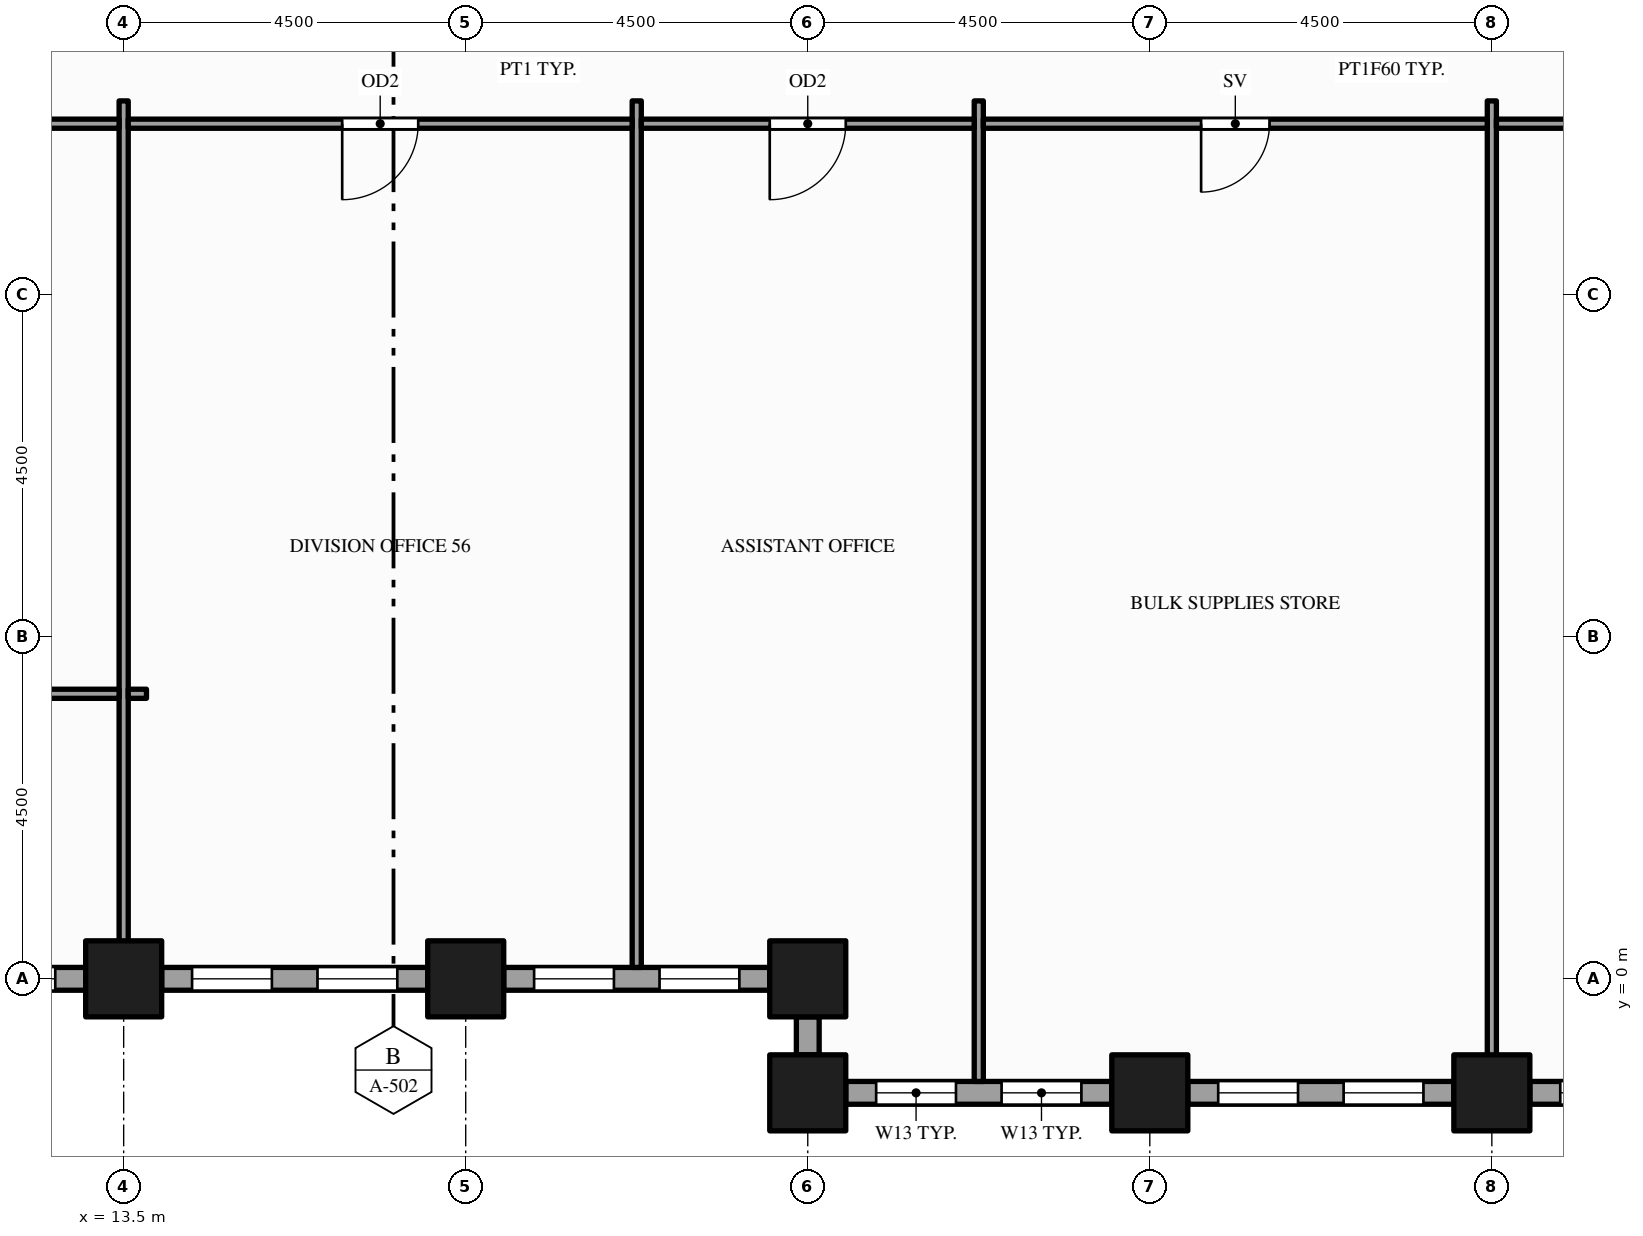
"""IFC4 building model, lengths in metres.
Left out: names, types, materials, properties, quantities, classifications, styles, units other than length and angle.
Written with IfcOpenShell. Run it as: python <this file> out.ifc"""

import sys

from ifc_helpers import new_model, si_unit, direction, frame, frame_2d, origin, origin_2d, place, context, subcontext, project, spatial, rectangle, hollow_rectangle, extrude, element, fill, save


model = new_model("IFC4")
c1 = context("Model", 3, precision=1e-05, world=origin(), true_north=direction((0.0, 1.0)))
c2 = subcontext(c1, "Body", "Model", "MODEL_VIEW")
j1 = project(units=[si_unit("LENGTHUNIT", "METRE"), si_unit("PLANEANGLEUNIT", "RADIAN")], contexts=[c1])
p1 = place(None, origin())
s1 = spatial("IfcSite", under=j1, at=p1, CompositionType="ELEMENT")
p2 = place(p1, origin())
s2 = spatial("IfcBuilding", under=s1, at=p2, CompositionType="ELEMENT")
p3 = place(p2, frame((0.0, 0.0, 127.0)))
s3 = spatial("IfcBuildingStorey", under=s2, at=p3, CompositionType="ELEMENT", Elevation=127.0)
for number, where, z_axis, x_axis in (
    (1, (13.5, 0.0, -0.15), (0.0, 0.0, 1.0), (1.0, 0.0, 0.0)),
    (2, (18.0, 0.0, -0.15), (0.0, 0.0, 1.0), (1.0, 0.0, 0.0)),
    (3, (22.5, -1.5, -0.15), (0.0, 0.0, 1.0), (1.0, 0.0, 0.0)),
    (4, (22.5, 0.0, -0.15), (0.0, 0.0, 1.0), (1.0, 0.0, 0.0)),
    (5, (27.0, -1.5, -0.15), (0.0, 0.0, 1.0), (1.0, 0.0, 0.0)),
    (6, (31.5, -1.5, -0.15), (0.0, 0.0, 1.0), (1.0, 0.0, 0.0)),
):
    element("IfcColumn", number, at=place(p3, frame(where, z_axis=z_axis, x_axis=x_axis)), inside=s3, PredefinedType="COLUMN", context=c2, shape_type="SweptSolid", body=[
        extrude(hollow_rectangle(XDim=1.0, YDim=1.0, WallThickness=0.05, at=origin_2d()), origin(), (0.0, 0.0, 1.0), 3.9),
    ])
p4 = place(p3, frame((23.0, -1.5, 0.0), z_axis=(0.0, 0.0, 1.0), x_axis=(1.0, 0.0, 0.0)))
e7 = element("IfcWall", 7, at=p4, inside=s3, PredefinedType="STANDARD", context=c2, shape_type="SweptSolid", body=[
    extrude(rectangle(XDim=3.5, YDim=0.3, at=frame_2d((1.75, 0.0))), origin(), (0.0, 0.0, 1.0), 3.054),
])
p5 = place(p4, frame((0.4, 0.0, 0.9)))
e8 = element("IfcOpeningElement", 8, at=p5, cuts=e7, PredefinedType="OPENING", context=c2, shape_type="SweptSolid", body=[
    extrude(rectangle(XDim=1.05, YDim=2.0, at=frame_2d((0.525, 1.0))), frame((0.0, 0.16, 0.0), z_axis=(0.0, -1.0, 0.0), x_axis=(1.0, 0.0, 0.0)), (0.0, 0.0, 1.0), 0.32),
])
p6 = place(p4, frame((2.05, 0.0, 0.9)))
e9 = element("IfcOpeningElement", 9, at=p6, cuts=e7, PredefinedType="OPENING", context=c2, shape_type="SweptSolid", body=[
    extrude(rectangle(XDim=1.05, YDim=2.0, at=frame_2d((0.525, 1.0))), frame((0.0, 0.16, 0.0), z_axis=(0.0, -1.0, 0.0), x_axis=(1.0, 0.0, 0.0)), (0.0, 0.0, 1.0), 0.32),
])
p7 = place(p3, frame((27.5, -1.5, 0.0), z_axis=(0.0, 0.0, 1.0), x_axis=(1.0, 0.0, 0.0)))
e10 = element("IfcWall", 10, at=p7, inside=s3, PredefinedType="STANDARD", context=c2, shape_type="SweptSolid", body=[
    extrude(rectangle(XDim=3.5, YDim=0.3, at=frame_2d((1.75, 0.0))), origin(), (0.0, 0.0, 1.0), 3.054),
])
p8 = place(p7, frame((0.4, 0.0, 0.9)))
e11 = element("IfcOpeningElement", 11, at=p8, cuts=e10, PredefinedType="OPENING", context=c2, shape_type="SweptSolid", body=[
    extrude(rectangle(XDim=1.05, YDim=2.0, at=frame_2d((0.525, 1.0))), frame((0.0, 0.16, 0.0), z_axis=(0.0, -1.0, 0.0), x_axis=(1.0, 0.0, 0.0)), (0.0, 0.0, 1.0), 0.32),
])
p9 = place(p7, frame((2.05, 0.0, 0.9)))
e12 = element("IfcOpeningElement", 12, at=p9, cuts=e10, PredefinedType="OPENING", context=c2, shape_type="SweptSolid", body=[
    extrude(rectangle(XDim=1.05, YDim=2.0, at=frame_2d((0.525, 1.0))), frame((0.0, 0.16, 0.0), z_axis=(0.0, -1.0, 0.0), x_axis=(1.0, 0.0, 0.0)), (0.0, 0.0, 1.0), 0.32),
])
p10 = place(p3, frame((32.0, -1.5, 0.0), z_axis=(0.0, 0.0, 1.0), x_axis=(1.0, 0.0, 0.0)))
e13 = element("IfcWall", 13, at=p10, inside=s3, PredefinedType="STANDARD", context=c2, shape_type="SweptSolid", body=[
    extrude(rectangle(XDim=3.5, YDim=0.3, at=frame_2d((1.75, 0.0))), origin(), (0.0, 0.0, 1.0), 3.054),
])
p11 = place(p10, frame((0.4, 0.0, 0.9)))
e14 = element("IfcOpeningElement", 14, at=p11, cuts=e13, PredefinedType="OPENING", context=c2, shape_type="SweptSolid", body=[
    extrude(rectangle(XDim=1.05, YDim=2.0, at=frame_2d((0.525, 1.0))), frame((0.0, 0.16, 0.0), z_axis=(0.0, -1.0, 0.0), x_axis=(1.0, 0.0, 0.0)), (0.0, 0.0, 1.0), 0.32),
])
p12 = place(p10, frame((2.05, 0.0, 0.9)))
e15 = element("IfcOpeningElement", 15, at=p12, cuts=e13, PredefinedType="OPENING", context=c2, shape_type="SweptSolid", body=[
    extrude(rectangle(XDim=1.05, YDim=2.0, at=frame_2d((0.525, 1.0))), frame((0.0, 0.16, 0.0), z_axis=(0.0, -1.0, 0.0), x_axis=(1.0, 0.0, 0.0)), (0.0, 0.0, 1.0), 0.32),
])
p13 = place(p3, frame((9.5, 0.0, 0.0), z_axis=(0.0, 0.0, 1.0), x_axis=(1.0, 0.0, 0.0)))
e16 = element("IfcWall", 16, at=p13, inside=s3, PredefinedType="STANDARD", context=c2, shape_type="SweptSolid", body=[
    extrude(rectangle(XDim=3.5, YDim=0.3, at=frame_2d((1.75, 0.0))), origin(), (0.0, 0.0, 1.0), 3.054),
])
p14 = place(p13, frame((0.4, 0.0, 0.9)))
e17 = element("IfcOpeningElement", 17, at=p14, cuts=e16, PredefinedType="OPENING", context=c2, shape_type="SweptSolid", body=[
    extrude(rectangle(XDim=1.05, YDim=2.0, at=frame_2d((0.525, 1.0))), frame((0.0, 0.16, 0.0), z_axis=(0.0, -1.0, 0.0), x_axis=(1.0, 0.0, 0.0)), (0.0, 0.0, 1.0), 0.32),
])
p15 = place(p13, frame((2.05, 0.0, 0.9)))
e18 = element("IfcOpeningElement", 18, at=p15, cuts=e16, PredefinedType="OPENING", context=c2, shape_type="SweptSolid", body=[
    extrude(rectangle(XDim=1.05, YDim=2.0, at=frame_2d((0.525, 1.0))), frame((0.0, 0.16, 0.0), z_axis=(0.0, -1.0, 0.0), x_axis=(1.0, 0.0, 0.0)), (0.0, 0.0, 1.0), 0.32),
])
p16 = place(p3, frame((14.0, 0.0, 0.0), z_axis=(0.0, 0.0, 1.0), x_axis=(1.0, 0.0, 0.0)))
e19 = element("IfcWall", 19, at=p16, inside=s3, PredefinedType="STANDARD", context=c2, shape_type="SweptSolid", body=[
    extrude(rectangle(XDim=3.5, YDim=0.3, at=frame_2d((1.75, 0.0))), origin(), (0.0, 0.0, 1.0), 3.054),
])
p17 = place(p16, frame((0.4, 0.0, 0.9)))
e20 = element("IfcOpeningElement", 20, at=p17, cuts=e19, PredefinedType="OPENING", context=c2, shape_type="SweptSolid", body=[
    extrude(rectangle(XDim=1.05, YDim=2.0, at=frame_2d((0.525, 1.0))), frame((0.0, 0.16, 0.0), z_axis=(0.0, -1.0, 0.0), x_axis=(1.0, 0.0, 0.0)), (0.0, 0.0, 1.0), 0.32),
])
p18 = place(p16, frame((2.05, 0.0, 0.9)))
e21 = element("IfcOpeningElement", 21, at=p18, cuts=e19, PredefinedType="OPENING", context=c2, shape_type="SweptSolid", body=[
    extrude(rectangle(XDim=1.05, YDim=2.0, at=frame_2d((0.525, 1.0))), frame((0.0, 0.16, 0.0), z_axis=(0.0, -1.0, 0.0), x_axis=(1.0, 0.0, 0.0)), (0.0, 0.0, 1.0), 0.32),
])
p19 = place(p3, frame((18.5, 0.0, 0.0), z_axis=(0.0, 0.0, 1.0), x_axis=(1.0, 0.0, 0.0)))
e22 = element("IfcWall", 22, at=p19, inside=s3, PredefinedType="STANDARD", context=c2, shape_type="SweptSolid", body=[
    extrude(rectangle(XDim=3.5, YDim=0.3, at=frame_2d((1.75, 0.0))), origin(), (0.0, 0.0, 1.0), 3.054),
])
p20 = place(p19, frame((0.4, 0.0, 0.9)))
e23 = element("IfcOpeningElement", 23, at=p20, cuts=e22, PredefinedType="OPENING", context=c2, shape_type="SweptSolid", body=[
    extrude(rectangle(XDim=1.05, YDim=2.0, at=frame_2d((0.525, 1.0))), frame((0.0, 0.16, 0.0), z_axis=(0.0, -1.0, 0.0), x_axis=(1.0, 0.0, 0.0)), (0.0, 0.0, 1.0), 0.32),
])
p21 = place(p19, frame((2.05, 0.0, 0.9)))
e24 = element("IfcOpeningElement", 24, at=p21, cuts=e22, PredefinedType="OPENING", context=c2, shape_type="SweptSolid", body=[
    extrude(rectangle(XDim=1.05, YDim=2.0, at=frame_2d((0.525, 1.0))), frame((0.0, 0.16, 0.0), z_axis=(0.0, -1.0, 0.0), x_axis=(1.0, 0.0, 0.0)), (0.0, 0.0, 1.0), 0.32),
])
p22 = place(p3, frame((22.5, -0.5, 0.0), z_axis=(0.0, 0.0, 1.0), x_axis=(0.0, -1.0, 0.0)))
e25 = element("IfcWall", 25, at=p22, inside=s3, PredefinedType="STANDARD", context=c2, shape_type="SweptSolid", body=[
    extrude(rectangle(XDim=0.5, YDim=0.3, at=frame_2d((0.25, 0.0))), origin(), (0.0, 0.0, 1.0), 3.054),
])
for number, where, z_axis, x_axis in (
    (26, (13.5, 0.15, 0.0), (0.0, 0.0, 1.0), (0.0, 1.0, 0.0)),
    (27, (20.25, 0.15, 0.0), (0.0, 0.0, 1.0), (0.0, 1.0, 0.0)),
):
    element("IfcWall", number, at=place(p3, frame(where, z_axis=z_axis, x_axis=x_axis)), inside=s3, PredefinedType="PARTITIONING", context=c2, shape_type="SweptSolid", body=[
        extrude(rectangle(XDim=11.4, YDim=0.12, at=frame_2d((5.7, 0.0))), origin(), (0.0, 0.0, 1.0), 2.838),
    ])
p23 = place(p3, frame((24.75, -1.35, 0.0), z_axis=(0.0, 0.0, 1.0), x_axis=(0.0, 1.0, 0.0)))
e28 = element("IfcWall", 28, at=p23, inside=s3, PredefinedType="PARTITIONING", context=c2, shape_type="SweptSolid", body=[
    extrude(rectangle(XDim=12.9, YDim=0.12, at=frame_2d((6.45, 0.0))), origin(), (0.0, 0.0, 1.0), 2.838),
])
p24 = place(p3, frame((31.5, -1.35, 0.0), z_axis=(0.0, 0.0, 1.0), x_axis=(0.0, 1.0, 0.0)))
e29 = element("IfcWall", 29, at=p24, inside=s3, PredefinedType="PARTITIONING", context=c2, shape_type="SweptSolid", body=[
    extrude(rectangle(XDim=12.9, YDim=0.12, at=frame_2d((6.45, 0.0))), origin(), (0.0, 0.0, 1.0), 2.35),
])
p25 = place(p3, frame((9.125, 3.75, 0.0), z_axis=(0.0, 0.0, 1.0), x_axis=(1.0, 0.0, 0.0)))
e30 = element("IfcWall", 30, at=p25, inside=s3, PredefinedType="PARTITIONING", context=c2, shape_type="SweptSolid", body=[
    extrude(rectangle(XDim=4.315, YDim=0.12, at=frame_2d((2.157, 0.0))), origin(), (0.0, 0.0, 1.0), 2.838),
])
p26 = place(p3, frame((13.56, 3.75, 0.0), z_axis=(0.0, 0.0, 1.0), x_axis=(1.0, 0.0, 0.0)))
e31 = element("IfcWall", 31, at=p26, inside=s3, PredefinedType="PARTITIONING", context=c2, shape_type="SweptSolid", body=[
    extrude(rectangle(XDim=0.24, YDim=0.12, at=frame_2d((0.12, 0.0))), origin(), (0.0, 0.0, 1.0), 2.838),
])
p27 = place(p3, frame((0.15, 11.25, 0.0), z_axis=(0.0, 0.0, 1.0), x_axis=(1.0, 0.0, 0.0)))
e32 = element("IfcWall", 32, at=p27, inside=s3, PredefinedType="PARTITIONING", context=c2, shape_type="SweptSolid", body=[
    extrude(rectangle(XDim=13.29, YDim=0.12, at=frame_2d((6.645, 0.0))), origin(), (0.0, 0.0, 1.0), 2.838),
])
p28 = place(p27, frame((6.055, 0.0, 0.0)))
e33 = element("IfcOpeningElement", 33, at=p28, cuts=e32, PredefinedType="OPENING", context=c2, shape_type="SweptSolid", body=[
    extrude(rectangle(XDim=1.2, YDim=2.1, at=frame_2d((0.6, 1.05))), frame((0.0, 0.07, 0.0), z_axis=(0.0, -1.0, 0.0), x_axis=(1.0, 0.0, 0.0)), (0.0, 0.0, 1.0), 0.14),
])
p29 = place(p3, frame((13.56, 11.25, 0.0), z_axis=(0.0, 0.0, 1.0), x_axis=(1.0, 0.0, 0.0)))
e34 = element("IfcWall", 34, at=p29, inside=s3, PredefinedType="PARTITIONING", context=c2, shape_type="SweptSolid", body=[
    extrude(rectangle(XDim=6.63, YDim=0.12, at=frame_2d((3.315, 0.0))), origin(), (0.0, 0.0, 1.0), 2.838),
])
p30 = place(p29, frame((2.815, 0.0, 0.0)))
e35 = element("IfcOpeningElement", 35, at=p30, cuts=e34, PredefinedType="OPENING", context=c2, shape_type="SweptSolid", body=[
    extrude(rectangle(XDim=1.0, YDim=2.1, at=frame_2d((0.5, 1.05))), frame((0.0, 0.07, 0.0), z_axis=(0.0, -1.0, 0.0), x_axis=(1.0, 0.0, 0.0)), (0.0, 0.0, 1.0), 0.14),
])
p31 = place(p3, frame((20.31, 11.25, 0.0), z_axis=(0.0, 0.0, 1.0), x_axis=(1.0, 0.0, 0.0)))
e36 = element("IfcWall", 36, at=p31, inside=s3, PredefinedType="PARTITIONING", context=c2, shape_type="SweptSolid", body=[
    extrude(rectangle(XDim=4.38, YDim=0.12, at=frame_2d((2.19, 0.0))), origin(), (0.0, 0.0, 1.0), 2.838),
])
p32 = place(p31, frame((1.69, 0.0, 0.0)))
e37 = element("IfcOpeningElement", 37, at=p32, cuts=e36, PredefinedType="OPENING", context=c2, shape_type="SweptSolid", body=[
    extrude(rectangle(XDim=1.0, YDim=2.1, at=frame_2d((0.5, 1.05))), frame((0.0, 0.07, 0.0), z_axis=(0.0, -1.0, 0.0), x_axis=(1.0, 0.0, 0.0)), (0.0, 0.0, 1.0), 0.14),
])
p33 = place(p3, frame((24.81, 11.25, 0.0), z_axis=(0.0, 0.0, 1.0), x_axis=(1.0, 0.0, 0.0)))
e38 = element("IfcWall", 38, at=p33, inside=s3, PredefinedType="PARTITIONING", context=c2, shape_type="SweptSolid", body=[
    extrude(rectangle(XDim=6.63, YDim=0.12, at=frame_2d((3.315, 0.0))), origin(), (0.0, 0.0, 1.0), 2.838),
])
p34 = place(p33, frame((2.865, 0.0, 0.0)))
e39 = element("IfcOpeningElement", 39, at=p34, cuts=e38, PredefinedType="OPENING", context=c2, shape_type="SweptSolid", body=[
    extrude(rectangle(XDim=0.9, YDim=2.1, at=frame_2d((0.45, 1.05))), frame((0.0, 0.07, 0.0), z_axis=(0.0, -1.0, 0.0), x_axis=(1.0, 0.0, 0.0)), (0.0, 0.0, 1.0), 0.14),
])
p35 = place(p3, frame((31.56, 11.25, 0.0), z_axis=(0.0, 0.0, 1.0), x_axis=(1.0, 0.0, 0.0)))
e40 = element("IfcWall", 40, at=p35, inside=s3, PredefinedType="PARTITIONING", context=c2, shape_type="SweptSolid", body=[
    extrude(rectangle(XDim=6.63, YDim=0.12, at=frame_2d((3.315, 0.0))), origin(), (0.0, 0.0, 1.0), 2.838),
])
p36 = place(p35, frame((2.865, 0.0, 0.0)))
e41 = element("IfcOpeningElement", 41, at=p36, cuts=e40, PredefinedType="OPENING", context=c2, shape_type="SweptSolid", body=[
    extrude(rectangle(XDim=0.9, YDim=2.1, at=frame_2d((0.45, 1.05))), frame((0.0, 0.07, 0.0), z_axis=(0.0, -1.0, 0.0), x_axis=(1.0, 0.0, 0.0)), (0.0, 0.0, 1.0), 0.14),
])
p37 = place(p5, origin())
e42 = element("IfcWindow", 42, at=p37, inside=s3, PartitioningType="SINGLE_PANEL", PredefinedType="WINDOW", context=c2, shape_type="SweptSolid", body=[
    extrude(rectangle(XDim=1.05, YDim=2.0, at=frame_2d((0.525, 1.0))), frame((0.0, 0.03, 0.0), z_axis=(0.0, -1.0, 0.0), x_axis=(1.0, 0.0, 0.0)), (0.0, 0.0, 1.0), 0.06),
])
fill(e8, e42)
p38 = place(p6, origin())
e43 = element("IfcWindow", 43, at=p38, inside=s3, PartitioningType="SINGLE_PANEL", PredefinedType="WINDOW", context=c2, shape_type="SweptSolid", body=[
    extrude(rectangle(XDim=1.05, YDim=2.0, at=frame_2d((0.525, 1.0))), frame((0.0, 0.03, 0.0), z_axis=(0.0, -1.0, 0.0), x_axis=(1.0, 0.0, 0.0)), (0.0, 0.0, 1.0), 0.06),
])
fill(e9, e43)
p39 = place(p8, origin())
e44 = element("IfcWindow", 44, at=p39, inside=s3, PartitioningType="SINGLE_PANEL", PredefinedType="WINDOW", context=c2, shape_type="SweptSolid", body=[
    extrude(rectangle(XDim=1.05, YDim=2.0, at=frame_2d((0.525, 1.0))), frame((0.0, 0.03, 0.0), z_axis=(0.0, -1.0, 0.0), x_axis=(1.0, 0.0, 0.0)), (0.0, 0.0, 1.0), 0.06),
])
fill(e11, e44)
p40 = place(p9, origin())
e45 = element("IfcWindow", 45, at=p40, inside=s3, PartitioningType="SINGLE_PANEL", PredefinedType="WINDOW", context=c2, shape_type="SweptSolid", body=[
    extrude(rectangle(XDim=1.05, YDim=2.0, at=frame_2d((0.525, 1.0))), frame((0.0, 0.03, 0.0), z_axis=(0.0, -1.0, 0.0), x_axis=(1.0, 0.0, 0.0)), (0.0, 0.0, 1.0), 0.06),
])
fill(e12, e45)
p41 = place(p11, origin())
e46 = element("IfcWindow", 46, at=p41, inside=s3, PartitioningType="SINGLE_PANEL", PredefinedType="WINDOW", context=c2, shape_type="SweptSolid", body=[
    extrude(rectangle(XDim=1.05, YDim=2.0, at=frame_2d((0.525, 1.0))), frame((0.0, 0.03, 0.0), z_axis=(0.0, -1.0, 0.0), x_axis=(1.0, 0.0, 0.0)), (0.0, 0.0, 1.0), 0.06),
])
fill(e14, e46)
p42 = place(p15, origin())
e47 = element("IfcWindow", 47, at=p42, inside=s3, PartitioningType="SINGLE_PANEL", PredefinedType="WINDOW", context=c2, shape_type="SweptSolid", body=[
    extrude(rectangle(XDim=1.05, YDim=2.0, at=frame_2d((0.525, 1.0))), frame((0.0, 0.03, 0.0), z_axis=(0.0, -1.0, 0.0), x_axis=(1.0, 0.0, 0.0)), (0.0, 0.0, 1.0), 0.06),
])
fill(e18, e47)
p43 = place(p17, origin())
e48 = element("IfcWindow", 48, at=p43, inside=s3, PartitioningType="SINGLE_PANEL", PredefinedType="WINDOW", context=c2, shape_type="SweptSolid", body=[
    extrude(rectangle(XDim=1.05, YDim=2.0, at=frame_2d((0.525, 1.0))), frame((0.0, 0.03, 0.0), z_axis=(0.0, -1.0, 0.0), x_axis=(1.0, 0.0, 0.0)), (0.0, 0.0, 1.0), 0.06),
])
fill(e20, e48)
p44 = place(p18, origin())
e49 = element("IfcWindow", 49, at=p44, inside=s3, PartitioningType="SINGLE_PANEL", PredefinedType="WINDOW", context=c2, shape_type="SweptSolid", body=[
    extrude(rectangle(XDim=1.05, YDim=2.0, at=frame_2d((0.525, 1.0))), frame((0.0, 0.03, 0.0), z_axis=(0.0, -1.0, 0.0), x_axis=(1.0, 0.0, 0.0)), (0.0, 0.0, 1.0), 0.06),
])
fill(e21, e49)
p45 = place(p20, origin())
e50 = element("IfcWindow", 50, at=p45, inside=s3, PartitioningType="SINGLE_PANEL", PredefinedType="WINDOW", context=c2, shape_type="SweptSolid", body=[
    extrude(rectangle(XDim=1.05, YDim=2.0, at=frame_2d((0.525, 1.0))), frame((0.0, 0.03, 0.0), z_axis=(0.0, -1.0, 0.0), x_axis=(1.0, 0.0, 0.0)), (0.0, 0.0, 1.0), 0.06),
])
fill(e23, e50)
p46 = place(p21, origin())
e51 = element("IfcWindow", 51, at=p46, inside=s3, PartitioningType="SINGLE_PANEL", PredefinedType="WINDOW", context=c2, shape_type="SweptSolid", body=[
    extrude(rectangle(XDim=1.05, YDim=2.0, at=frame_2d((0.525, 1.0))), frame((0.0, 0.03, 0.0), z_axis=(0.0, -1.0, 0.0), x_axis=(1.0, 0.0, 0.0)), (0.0, 0.0, 1.0), 0.06),
])
fill(e24, e51)
p47 = place(p30, origin())
e52 = element("IfcDoor", 52, at=p47, inside=s3, OperationType="SINGLE_SWING_LEFT", PredefinedType="DOOR", context=c2, shape_type="SweptSolid", body=[
    extrude(rectangle(XDim=1.0, YDim=2.1, at=frame_2d((0.5, 1.05))), frame((0.0, 0.025, 0.0), z_axis=(0.0, -1.0, 0.0), x_axis=(1.0, 0.0, 0.0)), (0.0, 0.0, 1.0), 0.05),
])
fill(e35, e52)
p48 = place(p32, origin())
e53 = element("IfcDoor", 53, at=p48, inside=s3, OperationType="SINGLE_SWING_LEFT", PredefinedType="DOOR", context=c2, shape_type="SweptSolid", body=[
    extrude(rectangle(XDim=1.0, YDim=2.1, at=frame_2d((0.5, 1.05))), frame((0.0, 0.025, 0.0), z_axis=(0.0, -1.0, 0.0), x_axis=(1.0, 0.0, 0.0)), (0.0, 0.0, 1.0), 0.05),
])
fill(e37, e53)
p49 = place(p34, origin())
e54 = element("IfcDoor", 54, at=p49, inside=s3, OperationType="SINGLE_SWING_LEFT", PredefinedType="DOOR", context=c2, shape_type="SweptSolid", body=[
    extrude(rectangle(XDim=0.9, YDim=2.1, at=frame_2d((0.45, 1.05))), frame((0.0, 0.025, 0.0), z_axis=(0.0, -1.0, 0.0), x_axis=(1.0, 0.0, 0.0)), (0.0, 0.0, 1.0), 0.05),
])
fill(e39, e54)
save(model, sys.argv[1])
